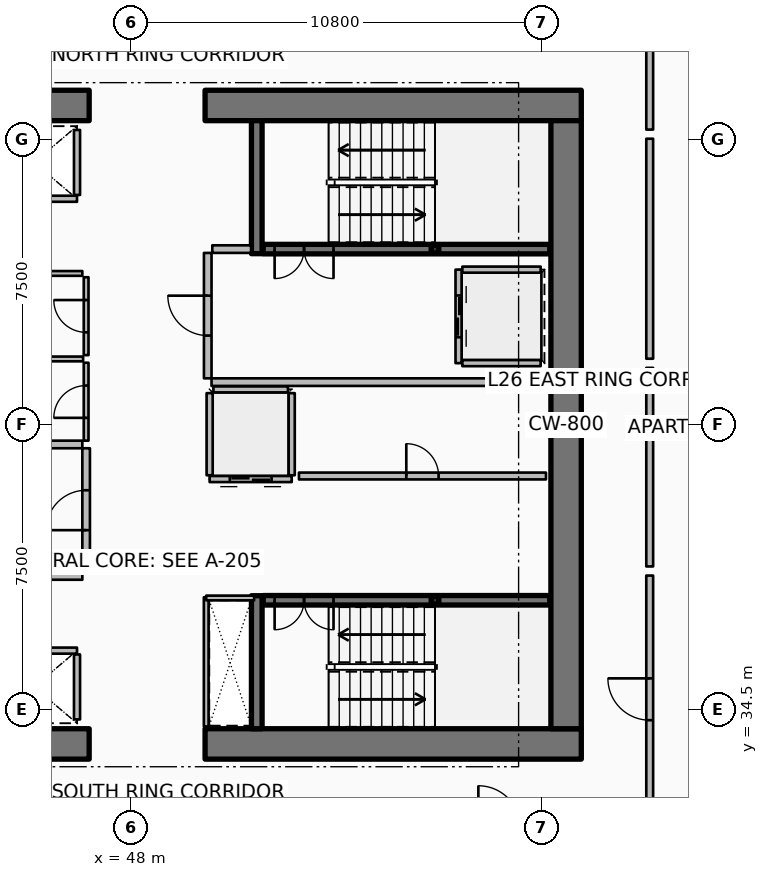
"""IFC4 building model, lengths in metres.
Left out: names, types, materials, properties, quantities, classifications, styles, units other than length and angle.
Written with IfcOpenShell. Run it as: python <this file> out.ifc"""

import sys

from ifc_helpers import new_model, si_unit, direction, frame, frame_2d, origin, origin_2d, place, context, subcontext, project, spatial, rectangle, hollow_rectangle, extrude, element, fill, save


model = new_model("IFC4")
c1 = context("Model", 3, precision=1e-05, world=origin(), true_north=direction((0.0, 1.0)))
c2 = subcontext(c1, "Body", "Model", "MODEL_VIEW")
j1 = project(units=[si_unit("LENGTHUNIT", "METRE"), si_unit("PLANEANGLEUNIT", "RADIAN")], contexts=[c1])
p1 = place(None, origin())
s1 = spatial("IfcSite", under=j1, at=p1, CompositionType="ELEMENT")
p2 = place(p1, origin())
s2 = spatial("IfcBuilding", under=s1, at=p2, CompositionType="ELEMENT")
p3 = place(p2, frame((0.0, 0.0, 105.15)))
s3 = spatial("IfcBuildingStorey", under=s2, at=p3, CompositionType="ELEMENT", Elevation=105.15)
p4 = place(p3, frame((37.0, 33.6, 0.0), z_axis=(0.0, 0.0, 1.0), x_axis=(1.0, 0.0, 0.0)))
e1 = element("IfcWall", 1, at=p4, inside=s3, PredefinedType="SHEAR", context=c2, shape_type="SweptSolid", body=[
    extrude(rectangle(XDim=9.9, YDim=0.8, at=frame_2d((4.95, 0.0))), origin(), (0.0, 0.0, 1.0), 3.75),
])
p5 = place(p3, frame((49.95, 33.6, 0.0), z_axis=(0.0, 0.0, 1.0), x_axis=(1.0, 0.0, 0.0)))
e2 = element("IfcWall", 2, at=p5, inside=s3, PredefinedType="SHEAR", context=c2, shape_type="SweptSolid", body=[
    extrude(rectangle(XDim=9.9, YDim=0.8, at=frame_2d((4.95, 0.0))), origin(), (0.0, 0.0, 1.0), 3.75),
])
p6 = place(p3, frame((37.0, 50.4, 0.0), z_axis=(0.0, 0.0, 1.0), x_axis=(1.0, 0.0, 0.0)))
e3 = element("IfcWall", 3, at=p6, inside=s3, PredefinedType="SHEAR", context=c2, shape_type="SweptSolid", body=[
    extrude(rectangle(XDim=9.9, YDim=0.8, at=frame_2d((4.95, 0.0))), origin(), (0.0, 0.0, 1.0), 3.75),
])
p7 = place(p3, frame((49.95, 50.4, 0.0), z_axis=(0.0, 0.0, 1.0), x_axis=(1.0, 0.0, 0.0)))
e4 = element("IfcWall", 4, at=p7, inside=s3, PredefinedType="SHEAR", context=c2, shape_type="SweptSolid", body=[
    extrude(rectangle(XDim=9.9, YDim=0.8, at=frame_2d((4.95, 0.0))), origin(), (0.0, 0.0, 1.0), 3.75),
])
p8 = place(p3, frame((59.45, 34.0, 0.0), z_axis=(0.0, 0.0, 1.0), x_axis=(0.0, 1.0, 0.0)))
e5 = element("IfcWall", 5, at=p8, inside=s3, PredefinedType="SHEAR", context=c2, shape_type="SweptSolid", body=[
    extrude(rectangle(XDim=16.0, YDim=0.8, at=frame_2d((8.0, 0.0))), origin(), (0.0, 0.0, 1.0), 3.75),
])
for number, where, z_axis, x_axis in (
    (6, (51.31, 46.5, 0.0), (0.0, 0.0, 1.0), (0.0, 1.0, 0.0)),
    (7, (51.31, 34.0, 0.0), (0.0, 0.0, 1.0), (0.0, 1.0, 0.0)),
):
    element("IfcWall", number, at=place(p3, frame(where, z_axis=z_axis, x_axis=x_axis)), inside=s3, PredefinedType="SHEAR", context=c2, shape_type="SweptSolid", body=[
        extrude(rectangle(XDim=3.5, YDim=0.28, at=frame_2d((1.75, 0.0))), origin(), (0.0, 0.0, 1.0), 3.75),
    ])
for number, where, z_axis, x_axis in (
    (8, (56.0, 46.62, 0.0), (0.0, 0.0, 1.0), (1.0, 0.0, 0.0)),
    (9, (56.0, 37.38, 0.0), (0.0, 0.0, 1.0), (1.0, 0.0, 0.0)),
):
    element("IfcColumn", number, at=place(p3, frame(where, z_axis=z_axis, x_axis=x_axis)), inside=s3, PredefinedType="COLUMN", context=c2, shape_type="SweptSolid", body=[
        extrude(hollow_rectangle(XDim=0.2, YDim=0.2, WallThickness=0.01, InnerFilletRadius=0.01, OuterFilletRadius=0.02, at=origin_2d()), origin(), (0.0, 0.0, 1.0), 1.67),
    ])
p9 = place(p3, frame((51.48, 46.62, 0.0), z_axis=(0.0, 0.0, 1.0), x_axis=(1.0, 0.0, 0.0)))
e10 = element("IfcWall", 10, at=p9, inside=s3, PredefinedType="SOLIDWALL", context=c2, shape_type="SweptSolid", body=[
    extrude(rectangle(XDim=7.54, YDim=0.25, at=frame_2d((3.77, 0.0))), origin(), (0.0, 0.0, 1.0), 3.5),
])
p10 = place(p9, frame((0.3, 0.0, 0.0)))
e11 = element("IfcOpeningElement", 11, at=p10, cuts=e10, PredefinedType="OPENING", context=c2, shape_type="SweptSolid", body=[
    extrude(rectangle(XDim=1.55, YDim=2.15, at=frame_2d((0.775, 1.075))), frame((0.0, 0.135, 0.0), z_axis=(0.0, -1.0, 0.0), x_axis=(1.0, 0.0, 0.0)), (0.0, 0.0, 1.0), 0.27),
])
p11 = place(p3, frame((51.48, 37.38, 0.0), z_axis=(0.0, 0.0, 1.0), x_axis=(1.0, 0.0, 0.0)))
e12 = element("IfcWall", 12, at=p11, inside=s3, PredefinedType="SOLIDWALL", context=c2, shape_type="SweptSolid", body=[
    extrude(rectangle(XDim=7.54, YDim=0.25, at=frame_2d((3.77, 0.0))), origin(), (0.0, 0.0, 1.0), 3.5),
])
p12 = place(p11, frame((0.3, 0.0, 0.0)))
e13 = element("IfcOpeningElement", 13, at=p12, cuts=e12, PredefinedType="OPENING", context=c2, shape_type="SweptSolid", body=[
    extrude(rectangle(XDim=1.55, YDim=2.15, at=frame_2d((0.775, 1.075))), frame((0.0, 0.135, 0.0), z_axis=(0.0, -1.0, 0.0), x_axis=(1.0, 0.0, 0.0)), (0.0, 0.0, 1.0), 0.27),
])
p13 = place(p3, frame((46.58, 47.945, 0.0), z_axis=(0.0, 0.0, 1.0), x_axis=(-1.0, 0.0, 0.0)))
e14 = element("IfcWall", 14, at=p13, inside=s3, PredefinedType="PARTITIONING", context=c2, shape_type="SweptSolid", body=[
    extrude(rectangle(XDim=2.26, YDim=0.16, at=frame_2d((1.13, 0.0))), origin(), (0.0, 0.0, 1.0), 3.5),
])
p14 = place(p3, frame((46.58, 48.045, 0.0), z_axis=(0.0, 0.0, 1.0), x_axis=(0.0, 1.0, 0.0)))
e15 = element("IfcWall", 15, at=p14, inside=s3, PredefinedType="PARTITIONING", context=c2, shape_type="SweptSolid", body=[
    extrude(rectangle(XDim=1.71, YDim=0.16, at=frame_2d((0.855, 0.0))), origin(), (0.0, 0.0, 1.0), 3.5),
])
p15 = place(p3, frame((44.32, 36.055, 0.0), z_axis=(0.0, 0.0, 1.0), x_axis=(1.0, 0.0, 0.0)))
e16 = element("IfcWall", 16, at=p15, inside=s3, PredefinedType="PARTITIONING", context=c2, shape_type="SweptSolid", body=[
    extrude(rectangle(XDim=2.26, YDim=0.16, at=frame_2d((1.13, 0.0))), origin(), (0.0, 0.0, 1.0), 3.5),
])
p16 = place(p3, frame((46.58, 34.245, 0.0), z_axis=(0.0, 0.0, 1.0), x_axis=(0.0, 1.0, 0.0)))
e17 = element("IfcWall", 17, at=p16, inside=s3, PredefinedType="PARTITIONING", context=c2, shape_type="SweptSolid", body=[
    extrude(rectangle(XDim=1.71, YDim=0.16, at=frame_2d((0.855, 0.0))), origin(), (0.0, 0.0, 1.0), 3.5),
])
p17 = place(p3, frame((56.62, 46.08, 0.0), z_axis=(0.0, 0.0, 1.0), x_axis=(0.0, -1.0, 0.0)))
e18 = element("IfcWall", 18, at=p17, inside=s3, PredefinedType="PARTITIONING", context=c2, shape_type="SweptSolid", body=[
    extrude(rectangle(XDim=2.46, YDim=0.16, at=frame_2d((1.23, 0.0))), origin(), (0.0, 0.0, 1.0), 3.5),
])
p18 = place(p17, frame((0.68, 0.0, 0.0)))
e19 = element("IfcOpeningElement", 19, at=p18, cuts=e18, PredefinedType="OPENING", context=c2, shape_type="SweptSolid", body=[
    extrude(rectangle(XDim=1.1, YDim=2.1, at=frame_2d((0.55, 1.05))), frame((0.0, 0.09, 0.0), z_axis=(0.0, -1.0, 0.0), x_axis=(1.0, 0.0, 0.0)), (0.0, 0.0, 1.0), 0.18),
])
for number, where, z_axis, x_axis in (
    (20, (56.72, 46.08, 0.0), (0.0, 0.0, 1.0), (1.0, 0.0, 0.0)),
    (21, (56.72, 43.62, 0.0), (0.0, 0.0, 1.0), (1.0, 0.0, 0.0)),
):
    element("IfcWall", number, at=place(p3, frame(where, z_axis=z_axis, x_axis=x_axis)), inside=s3, PredefinedType="PARTITIONING", context=c2, shape_type="SweptSolid", body=[
        extrude(rectangle(XDim=2.06, YDim=0.16, at=frame_2d((1.03, 0.0))), origin(), (0.0, 0.0, 1.0), 3.5),
    ])
p19 = place(p3, frame((52.23, 40.57, 0.0), z_axis=(0.0, 0.0, 1.0), x_axis=(-1.0, 0.0, 0.0)))
e22 = element("IfcWall", 22, at=p19, inside=s3, PredefinedType="PARTITIONING", context=c2, shape_type="SweptSolid", body=[
    extrude(rectangle(XDim=2.16, YDim=0.16, at=frame_2d((1.08, 0.0))), origin(), (0.0, 0.0, 1.0), 3.5),
])
p20 = place(p19, frame((0.53, 0.0, 0.0)))
e23 = element("IfcOpeningElement", 23, at=p20, cuts=e22, PredefinedType="OPENING", context=c2, shape_type="SweptSolid", body=[
    extrude(rectangle(XDim=1.1, YDim=2.1, at=frame_2d((0.55, 1.05))), frame((0.0, 0.09, 0.0), z_axis=(0.0, -1.0, 0.0), x_axis=(1.0, 0.0, 0.0)), (0.0, 0.0, 1.0), 0.18),
])
for number, where, z_axis, x_axis in (
    (24, (52.23, 40.67, 0.0), (0.0, 0.0, 1.0), (0.0, 1.0, 0.0)),
    (25, (50.07, 40.67, 0.0), (0.0, 0.0, 1.0), (0.0, 1.0, 0.0)),
):
    element("IfcWall", number, at=place(p3, frame(where, z_axis=z_axis, x_axis=x_axis)), inside=s3, PredefinedType="PARTITIONING", context=c2, shape_type="SweptSolid", body=[
        extrude(rectangle(XDim=2.16, YDim=0.16, at=frame_2d((1.08, 0.0))), origin(), (0.0, 0.0, 1.0), 3.5),
    ])
p21 = place(p3, frame((50.17, 42.93, 0.0), z_axis=(0.0, 0.0, 1.0), x_axis=(1.0, 0.0, 0.0)))
e26 = element("IfcWall", 26, at=p21, inside=s3, PredefinedType="PARTITIONING", context=c2, shape_type="SweptSolid", body=[
    extrude(rectangle(XDim=1.96, YDim=0.16, at=frame_2d((0.98, 0.0))), origin(), (0.0, 0.0, 1.0), 3.5),
])
p22 = place(p3, frame((52.42, 40.65, 0.0), z_axis=(0.0, 0.0, 1.0), x_axis=(1.0, 0.0, 0.0)))
e27 = element("IfcWall", 27, at=p22, inside=s3, PredefinedType="PARTITIONING", context=c2, shape_type="SweptSolid", body=[
    extrude(rectangle(XDim=6.5, YDim=0.18, at=frame_2d((3.25, 0.0))), origin(), (0.0, 0.0, 1.0), 3.5),
])
p23 = place(p22, frame((2.825, 0.0, 0.0)))
e28 = element("IfcOpeningElement", 28, at=p23, cuts=e27, PredefinedType="OPENING", context=c2, shape_type="SweptSolid", body=[
    extrude(rectangle(XDim=0.85, YDim=2.06, at=frame_2d((0.425, 1.03))), frame((0.0, 0.1, 0.0), z_axis=(0.0, -1.0, 0.0), x_axis=(1.0, 0.0, 0.0)), (0.0, 0.0, 1.0), 0.2),
])
p24 = place(p3, frame((41.35, 38.02, 0.0), z_axis=(0.0, 0.0, 1.0), x_axis=(1.0, 0.0, 0.0)))
e29 = element("IfcWall", 29, at=p24, inside=s3, PredefinedType="PARTITIONING", context=c2, shape_type="SweptSolid", body=[
    extrude(rectangle(XDim=5.37, YDim=0.2, at=frame_2d((2.685, 0.0))), origin(), (0.0, 0.0, 1.0), 3.5),
])
p25 = place(p3, frame((43.92, 41.48, 0.0), z_axis=(0.0, 0.0, 1.0), x_axis=(1.0, 0.0, 0.0)))
e30 = element("IfcWall", 30, at=p25, inside=s3, PredefinedType="PARTITIONING", context=c2, shape_type="SweptSolid", body=[
    extrude(rectangle(XDim=2.8, YDim=0.2, at=frame_2d((1.4, 0.0))), origin(), (0.0, 0.0, 1.0), 3.5),
])
p26 = place(p3, frame((46.82, 38.12, 0.0), z_axis=(0.0, 0.0, 1.0), x_axis=(0.0, 1.0, 0.0)))
e31 = element("IfcWall", 31, at=p26, inside=s3, PredefinedType="PARTITIONING", context=c2, shape_type="SweptSolid", body=[
    extrude(rectangle(XDim=3.26, YDim=0.2, at=frame_2d((1.63, 0.0))), origin(), (0.0, 0.0, 1.0), 3.5),
])
p27 = place(p26, frame((1.105, 0.0, 0.0)))
e32 = element("IfcOpeningElement", 32, at=p27, cuts=e31, PredefinedType="OPENING", context=c2, shape_type="SweptSolid", body=[
    extrude(rectangle(XDim=1.05, YDim=2.1, at=frame_2d((0.525, 1.05))), frame((0.0, 0.11, 0.0), z_axis=(0.0, -1.0, 0.0), x_axis=(1.0, 0.0, 0.0)), (0.0, 0.0, 1.0), 0.22),
])
p28 = place(p3, frame((50.12, 43.12, 0.0), z_axis=(0.0, 0.0, 1.0), x_axis=(1.0, 0.0, 0.0)))
e33 = element("IfcWall", 33, at=p28, inside=s3, PredefinedType="PARTITIONING", context=c2, shape_type="SweptSolid", body=[
    extrude(rectangle(XDim=8.88, YDim=0.2, at=frame_2d((4.44, 0.0))), origin(), (0.0, 0.0, 1.0), 3.5),
])
p29 = place(p3, frame((50.14, 46.62, 0.0), z_axis=(0.0, 0.0, 1.0), x_axis=(1.0, 0.0, 0.0)))
e34 = element("IfcWall", 34, at=p29, inside=s3, PredefinedType="PARTITIONING", context=c2, shape_type="SweptSolid", body=[
    extrude(rectangle(XDim=1.02, YDim=0.2, at=frame_2d((0.51, 0.0))), origin(), (0.0, 0.0, 1.0), 3.5),
])
p30 = place(p3, frame((50.02, 43.22, 0.0), z_axis=(0.0, 0.0, 1.0), x_axis=(0.0, 1.0, 0.0)))
e35 = element("IfcWall", 35, at=p30, inside=s3, PredefinedType="PARTITIONING", context=c2, shape_type="SweptSolid", body=[
    extrude(rectangle(XDim=3.3, YDim=0.2, at=frame_2d((1.65, 0.0))), origin(), (0.0, 0.0, 1.0), 3.5),
])
p31 = place(p30, frame((1.125, 0.0, 0.0)))
e36 = element("IfcOpeningElement", 36, at=p31, cuts=e35, PredefinedType="OPENING", context=c2, shape_type="SweptSolid", body=[
    extrude(rectangle(XDim=1.05, YDim=2.1, at=frame_2d((0.525, 1.05))), frame((0.0, 0.11, 0.0), z_axis=(0.0, -1.0, 0.0), x_axis=(1.0, 0.0, 0.0)), (0.0, 0.0, 1.0), 0.22),
])
p32 = place(p3, frame((41.36, 45.98, 0.0), z_axis=(0.0, 0.0, 1.0), x_axis=(1.0, 0.0, 0.0)))
e37 = element("IfcWall", 37, at=p32, inside=s3, PredefinedType="PARTITIONING", context=c2, shape_type="SweptSolid", body=[
    extrude(rectangle(XDim=5.36, YDim=0.125, at=frame_2d((2.68, 0.0))), origin(), (0.0, 0.0, 1.0), 2.94),
])
p33 = place(p3, frame((49.98, 34.06, 0.0), z_axis=(0.0, 0.0, 1.0), x_axis=(0.0, 1.0, 0.0)))
e38 = element("IfcWall", 38, at=p33, inside=s3, PredefinedType="PARTITIONING", context=c2, shape_type="SweptSolid", body=[
    extrude(rectangle(XDim=3.4, YDim=0.125, at=frame_2d((1.7, 0.0))), origin(), (0.0, 0.0, 1.0), 2.94),
])
p34 = place(p3, frame((49.98, 37.44, 0.0), z_axis=(0.0, 0.0, 1.0), x_axis=(1.0, 0.0, 0.0)))
e39 = element("IfcWall", 39, at=p34, inside=s3, PredefinedType="PARTITIONING", context=c2, shape_type="SweptSolid", body=[
    extrude(rectangle(XDim=1.26, YDim=0.125, at=frame_2d((0.63, 0.0))), origin(), (0.0, 0.0, 1.0), 2.94),
])
p35 = place(p3, frame((44.03, 43.73, 0.0), z_axis=(0.0, 0.0, 1.0), x_axis=(1.0, 0.0, 0.0)))
e40 = element("IfcWall", 40, at=p35, inside=s3, PredefinedType="PARTITIONING", context=c2, shape_type="SweptSolid", body=[
    extrude(rectangle(XDim=2.71, YDim=0.125, at=frame_2d((1.355, 0.0))), origin(), (0.0, 0.0, 1.0), 2.94),
])
p36 = place(p3, frame((46.82, 41.58, 0.0), z_axis=(0.0, 0.0, 1.0), x_axis=(0.0, 1.0, 0.0)))
e41 = element("IfcWall", 41, at=p36, inside=s3, PredefinedType="PARTITIONING", context=c2, shape_type="SweptSolid", body=[
    extrude(rectangle(XDim=2.05, YDim=0.125, at=frame_2d((1.025, 0.0))), origin(), (0.0, 0.0, 1.0), 2.94),
])
p37 = place(p36, frame((0.6, 0.0, 0.0)))
e42 = element("IfcOpeningElement", 42, at=p37, cuts=e41, PredefinedType="OPENING", context=c2, shape_type="SweptSolid", body=[
    extrude(rectangle(XDim=0.85, YDim=2.06, at=frame_2d((0.425, 1.03))), frame((0.0, 0.073, 0.0), z_axis=(0.0, -1.0, 0.0), x_axis=(1.0, 0.0, 0.0)), (0.0, 0.0, 1.0), 0.145),
])
p38 = place(p3, frame((46.82, 43.83, 0.0), z_axis=(0.0, 0.0, 1.0), x_axis=(0.0, 1.0, 0.0)))
e43 = element("IfcWall", 43, at=p38, inside=s3, PredefinedType="PARTITIONING", context=c2, shape_type="SweptSolid", body=[
    extrude(rectangle(XDim=2.05, YDim=0.125, at=frame_2d((1.025, 0.0))), origin(), (0.0, 0.0, 1.0), 2.94),
])
p39 = place(p38, frame((0.6, 0.0, 0.0)))
e44 = element("IfcOpeningElement", 44, at=p39, cuts=e43, PredefinedType="OPENING", context=c2, shape_type="SweptSolid", body=[
    extrude(rectangle(XDim=0.85, YDim=2.06, at=frame_2d((0.425, 1.03))), frame((0.0, 0.073, 0.0), z_axis=(0.0, -1.0, 0.0), x_axis=(1.0, 0.0, 0.0)), (0.0, 0.0, 1.0), 0.145),
])
p40 = place(p3, frame((61.65, 31.52, 0.0), z_axis=(0.0, 0.0, 1.0), x_axis=(0.0, 1.0, 0.0)))
e45 = element("IfcWall", 45, at=p40, inside=s3, PredefinedType="PARTITIONING", context=c2, shape_type="SweptSolid", body=[
    extrude(rectangle(XDim=6.51, YDim=0.18, at=frame_2d((3.255, 0.0))), origin(), (0.0, 0.0, 1.0), 2.94),
])
p41 = place(p40, frame((2.705, 0.0, 0.0)))
e46 = element("IfcOpeningElement", 46, at=p41, cuts=e45, PredefinedType="OPENING", context=c2, shape_type="SweptSolid", body=[
    extrude(rectangle(XDim=1.1, YDim=2.1, at=frame_2d((0.55, 1.05))), frame((0.0, 0.1, 0.0), z_axis=(0.0, -1.0, 0.0), x_axis=(1.0, 0.0, 0.0)), (0.0, 0.0, 1.0), 0.2),
])
p42 = place(p3, frame((61.65, 38.27, 0.0), z_axis=(0.0, 0.0, 1.0), x_axis=(0.0, 1.0, 0.0)))
e47 = element("IfcWall", 47, at=p42, inside=s3, PredefinedType="PARTITIONING", context=c2, shape_type="SweptSolid", body=[
    extrude(rectangle(XDim=5.225, YDim=0.18, at=frame_2d((2.613, 0.0))), origin(), (0.0, 0.0, 1.0), 2.94),
])
p43 = place(p3, frame((61.65, 43.736, 0.0), z_axis=(0.0, 0.0, 1.0), x_axis=(0.0, 1.0, 0.0)))
e48 = element("IfcWall", 48, at=p43, inside=s3, PredefinedType="PARTITIONING", context=c2, shape_type="SweptSolid", body=[
    extrude(rectangle(XDim=5.789, YDim=0.18, at=frame_2d((2.895, 0.0))), origin(), (0.0, 0.0, 1.0), 2.94),
])
p44 = place(p3, frame((61.65, 49.764, 0.0), z_axis=(0.0, 0.0, 1.0), x_axis=(0.0, 1.0, 0.0)))
e49 = element("IfcWall", 49, at=p44, inside=s3, PredefinedType="PARTITIONING", context=c2, shape_type="SweptSolid", body=[
    extrude(rectangle(XDim=2.716, YDim=0.18, at=frame_2d((1.358, 0.0))), origin(), (0.0, 0.0, 1.0), 2.94),
])
p45 = place(p10, origin())
e50 = element("IfcDoor", 50, at=p45, inside=s3, OperationType="DOUBLE_DOOR_SINGLE_SWING", PredefinedType="DOOR", context=c2, shape_type="SweptSolid", body=[
    extrude(rectangle(XDim=1.55, YDim=2.15, at=frame_2d((0.775, 1.075))), frame((0.0, 0.025, 0.0), z_axis=(0.0, -1.0, 0.0), x_axis=(1.0, 0.0, 0.0)), (0.0, 0.0, 1.0), 0.05),
])
fill(e11, e50)
p46 = place(p12, origin())
e51 = element("IfcDoor", 51, at=p46, inside=s3, OperationType="DOUBLE_DOOR_SINGLE_SWING", PredefinedType="DOOR", context=c2, shape_type="SweptSolid", body=[
    extrude(rectangle(XDim=1.55, YDim=2.15, at=frame_2d((0.775, 1.075))), frame((0.0, 0.025, 0.0), z_axis=(0.0, -1.0, 0.0), x_axis=(1.0, 0.0, 0.0)), (0.0, 0.0, 1.0), 0.05),
])
fill(e13, e51)
p47 = place(p18, origin())
e52 = element("IfcDoor", 52, at=p47, inside=s3, OperationType="DOUBLE_DOOR_SLIDING", PredefinedType="DOOR", context=c2, shape_type="SweptSolid", body=[
    extrude(rectangle(XDim=1.1, YDim=2.1, at=frame_2d((0.55, 1.05))), frame((0.0, 0.025, 0.0), z_axis=(0.0, -1.0, 0.0), x_axis=(1.0, 0.0, 0.0)), (0.0, 0.0, 1.0), 0.05),
])
fill(e19, e52)
p48 = place(p20, origin())
e53 = element("IfcDoor", 53, at=p48, inside=s3, OperationType="DOUBLE_DOOR_SLIDING", PredefinedType="DOOR", context=c2, shape_type="SweptSolid", body=[
    extrude(rectangle(XDim=1.1, YDim=2.1, at=frame_2d((0.55, 1.05))), frame((0.0, 0.025, 0.0), z_axis=(0.0, -1.0, 0.0), x_axis=(1.0, 0.0, 0.0)), (0.0, 0.0, 1.0), 0.05),
])
fill(e23, e53)
p49 = place(p23, origin())
e54 = element("IfcDoor", 54, at=p49, inside=s3, OperationType="SINGLE_SWING_LEFT", PredefinedType="DOOR", context=c2, shape_type="SweptSolid", body=[
    extrude(rectangle(XDim=0.85, YDim=2.06, at=frame_2d((0.425, 1.03))), frame((0.0, 0.025, 0.0), z_axis=(0.0, -1.0, 0.0), x_axis=(1.0, 0.0, 0.0)), (0.0, 0.0, 1.0), 0.05),
])
fill(e28, e54)
p50 = place(p27, origin())
e55 = element("IfcDoor", 55, at=p50, inside=s3, OperationType="SINGLE_SWING_LEFT", PredefinedType="DOOR", context=c2, shape_type="SweptSolid", body=[
    extrude(rectangle(XDim=1.05, YDim=2.1, at=frame_2d((0.525, 1.05))), frame((0.0, 0.025, 0.0), z_axis=(0.0, -1.0, 0.0), x_axis=(1.0, 0.0, 0.0)), (0.0, 0.0, 1.0), 0.05),
])
fill(e32, e55)
p51 = place(p31, origin())
e56 = element("IfcDoor", 56, at=p51, inside=s3, OperationType="SINGLE_SWING_RIGHT", PredefinedType="DOOR", context=c2, shape_type="SweptSolid", body=[
    extrude(rectangle(XDim=1.05, YDim=2.1, at=frame_2d((0.525, 1.05))), frame((0.0, 0.025, 0.0), z_axis=(0.0, -1.0, 0.0), x_axis=(1.0, 0.0, 0.0)), (0.0, 0.0, 1.0), 0.05),
])
fill(e36, e56)
p52 = place(p37, origin())
e57 = element("IfcDoor", 57, at=p52, inside=s3, OperationType="SINGLE_SWING_LEFT", PredefinedType="DOOR", context=c2, shape_type="SweptSolid", body=[
    extrude(rectangle(XDim=0.85, YDim=2.06, at=frame_2d((0.425, 1.03))), frame((0.0, 0.025, 0.0), z_axis=(0.0, -1.0, 0.0), x_axis=(1.0, 0.0, 0.0)), (0.0, 0.0, 1.0), 0.05),
])
fill(e42, e57)
p53 = place(p39, origin())
e58 = element("IfcDoor", 58, at=p53, inside=s3, OperationType="SINGLE_SWING_RIGHT", PredefinedType="DOOR", context=c2, shape_type="SweptSolid", body=[
    extrude(rectangle(XDim=0.85, YDim=2.06, at=frame_2d((0.425, 1.03))), frame((0.0, 0.025, 0.0), z_axis=(0.0, -1.0, 0.0), x_axis=(1.0, 0.0, 0.0)), (0.0, 0.0, 1.0), 0.05),
])
fill(e44, e58)
p54 = place(p41, origin())
e59 = element("IfcDoor", 59, at=p54, inside=s3, OperationType="SINGLE_SWING_RIGHT", PredefinedType="DOOR", context=c2, shape_type="SweptSolid", body=[
    extrude(rectangle(XDim=1.1, YDim=2.1, at=frame_2d((0.55, 1.05))), frame((0.0, 0.025, 0.0), z_axis=(0.0, -1.0, 0.0), x_axis=(1.0, 0.0, 0.0)), (0.0, 0.0, 1.0), 0.05),
])
fill(e46, e59)
save(model, sys.argv[1])
